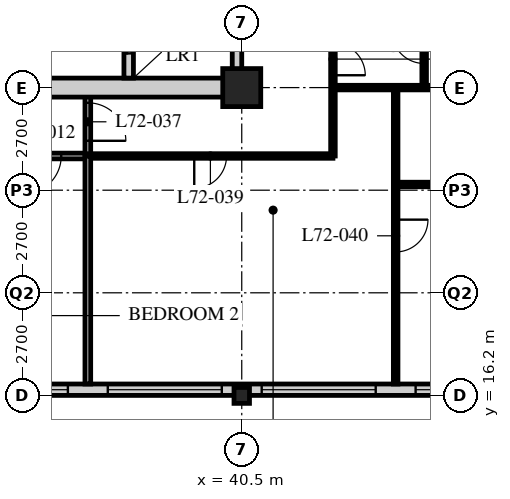
"""IFC4 building model, lengths in metres.
Left out: names, types, materials, properties, quantities, classifications, styles, units other than length and angle.
Written with IfcOpenShell. Run it as: python <this file> out.ifc"""

import sys

from ifc_helpers import new_model, si_unit, direction, frame, frame_2d, origin, origin_2d, place, context, subcontext, project, spatial, rectangle, hollow_rectangle, i_section, extrude, element, fill, save


model = new_model("IFC4")
c1 = context("Model", 3, precision=1e-05, world=origin(), true_north=direction((0.0, 1.0)))
c2 = subcontext(c1, "Body", "Model", "MODEL_VIEW")
j1 = project(units=[si_unit("LENGTHUNIT", "METRE"), si_unit("PLANEANGLEUNIT", "RADIAN")], contexts=[c1])
p1 = place(None, origin())
s1 = spatial("IfcSite", under=j1, at=p1, CompositionType="ELEMENT")
p2 = place(p1, origin())
s2 = spatial("IfcBuilding", under=s1, at=p2, CompositionType="ELEMENT")
p3 = place(p2, frame((0.0, 0.0, 281.4)))
s3 = spatial("IfcBuildingStorey", under=s2, at=p3, CompositionType="ELEMENT", Elevation=281.4)
p4 = place(p3, frame((40.5, 16.2, 0.0), z_axis=(0.0, 0.0, 1.0), x_axis=(1.0, 0.0, 0.0)))
e1 = element("IfcColumn", 1, at=p4, inside=s3, PredefinedType="COLUMN", context=c2, shape_type="SweptSolid", body=[
    extrude(i_section(OverallWidth=0.407, OverallDepth=0.419, WebThickness=0.031, FlangeThickness=0.049, FilletRadius=0.015, at=origin_2d()), origin(), (0.0, 0.0, 1.0), 3.9),
])
p5 = place(p3, frame((40.5, 24.3, 0.0), z_axis=(0.0, 0.0, 1.0), x_axis=(1.0, 0.0, 0.0)))
e2 = element("IfcColumn", 2, at=p5, inside=s3, PredefinedType="COLUMN", context=c2, shape_type="SweptSolid", body=[
    extrude(hollow_rectangle(XDim=1.0, YDim=1.0, WallThickness=0.1, at=origin_2d()), origin(), (0.0, 0.0, 1.0), 3.9),
])
p6 = place(p3, frame((8.4, 16.35, 0.0), z_axis=(0.0, 0.0, 1.0), x_axis=(1.0, 0.0, 0.0)))
e3 = element("IfcWall", 3, at=p6, inside=s3, PredefinedType="SOLIDWALL", context=c2, shape_type="SweptSolid", body=[
    extrude(rectangle(XDim=40.2, YDim=0.3, at=frame_2d((20.1, 0.0))), origin(), (0.0, 0.0, 1.0), 3.69),
])
p7 = place(p6, frame((0.225, 0.0, 0.6)))
e4 = element("IfcOpeningElement", 4, at=p7, cuts=e3, PredefinedType="OPENING", context=c2, shape_type="SweptSolid", body=[
    extrude(rectangle(XDim=3.0, YDim=2.4, at=frame_2d((1.5, 1.2))), frame((0.0, 0.16, 0.0), z_axis=(0.0, -1.0, 0.0), x_axis=(1.0, 0.0, 0.0)), (0.0, 0.0, 1.0), 0.32),
])
p8 = place(p6, frame((4.275, 0.0, 0.6)))
e5 = element("IfcOpeningElement", 5, at=p8, cuts=e3, PredefinedType="OPENING", context=c2, shape_type="SweptSolid", body=[
    extrude(rectangle(XDim=3.0, YDim=2.4, at=frame_2d((1.5, 1.2))), frame((0.0, 0.16, 0.0), z_axis=(0.0, -1.0, 0.0), x_axis=(1.0, 0.0, 0.0)), (0.0, 0.0, 1.0), 0.32),
])
p9 = place(p6, frame((8.325, 0.0, 0.6)))
e6 = element("IfcOpeningElement", 6, at=p9, cuts=e3, PredefinedType="OPENING", context=c2, shape_type="SweptSolid", body=[
    extrude(rectangle(XDim=3.0, YDim=2.4, at=frame_2d((1.5, 1.2))), frame((0.0, 0.16, 0.0), z_axis=(0.0, -1.0, 0.0), x_axis=(1.0, 0.0, 0.0)), (0.0, 0.0, 1.0), 0.32),
])
p10 = place(p6, frame((12.375, 0.0, 0.6)))
e7 = element("IfcOpeningElement", 7, at=p10, cuts=e3, PredefinedType="OPENING", context=c2, shape_type="SweptSolid", body=[
    extrude(rectangle(XDim=3.0, YDim=2.4, at=frame_2d((1.5, 1.2))), frame((0.0, 0.16, 0.0), z_axis=(0.0, -1.0, 0.0), x_axis=(1.0, 0.0, 0.0)), (0.0, 0.0, 1.0), 0.32),
])
p11 = place(p6, frame((16.425, 0.0, 0.6)))
e8 = element("IfcOpeningElement", 8, at=p11, cuts=e3, PredefinedType="OPENING", context=c2, shape_type="SweptSolid", body=[
    extrude(rectangle(XDim=3.0, YDim=2.4, at=frame_2d((1.5, 1.2))), frame((0.0, 0.16, 0.0), z_axis=(0.0, -1.0, 0.0), x_axis=(1.0, 0.0, 0.0)), (0.0, 0.0, 1.0), 0.32),
])
p12 = place(p6, frame((20.475, 0.0, 0.6)))
e9 = element("IfcOpeningElement", 9, at=p12, cuts=e3, PredefinedType="OPENING", context=c2, shape_type="SweptSolid", body=[
    extrude(rectangle(XDim=3.0, YDim=2.4, at=frame_2d((1.5, 1.2))), frame((0.0, 0.16, 0.0), z_axis=(0.0, -1.0, 0.0), x_axis=(1.0, 0.0, 0.0)), (0.0, 0.0, 1.0), 0.32),
])
p13 = place(p6, frame((24.525, 0.0, 0.6)))
e10 = element("IfcOpeningElement", 10, at=p13, cuts=e3, PredefinedType="OPENING", context=c2, shape_type="SweptSolid", body=[
    extrude(rectangle(XDim=3.0, YDim=2.4, at=frame_2d((1.5, 1.2))), frame((0.0, 0.16, 0.0), z_axis=(0.0, -1.0, 0.0), x_axis=(1.0, 0.0, 0.0)), (0.0, 0.0, 1.0), 0.32),
])
p14 = place(p6, frame((28.575, 0.0, 0.6)))
e11 = element("IfcOpeningElement", 11, at=p14, cuts=e3, PredefinedType="OPENING", context=c2, shape_type="SweptSolid", body=[
    extrude(rectangle(XDim=3.0, YDim=2.4, at=frame_2d((1.5, 1.2))), frame((0.0, 0.16, 0.0), z_axis=(0.0, -1.0, 0.0), x_axis=(1.0, 0.0, 0.0)), (0.0, 0.0, 1.0), 0.32),
])
p15 = place(p6, frame((32.625, 0.0, 0.6)))
e12 = element("IfcOpeningElement", 12, at=p15, cuts=e3, PredefinedType="OPENING", context=c2, shape_type="SweptSolid", body=[
    extrude(rectangle(XDim=3.0, YDim=2.4, at=frame_2d((1.5, 1.2))), frame((0.0, 0.16, 0.0), z_axis=(0.0, -1.0, 0.0), x_axis=(1.0, 0.0, 0.0)), (0.0, 0.0, 1.0), 0.32),
])
p16 = place(p6, frame((36.675, 0.0, 0.6)))
e13 = element("IfcOpeningElement", 13, at=p16, cuts=e3, PredefinedType="OPENING", context=c2, shape_type="SweptSolid", body=[
    extrude(rectangle(XDim=3.0, YDim=2.4, at=frame_2d((1.5, 1.2))), frame((0.0, 0.16, 0.0), z_axis=(0.0, -1.0, 0.0), x_axis=(1.0, 0.0, 0.0)), (0.0, 0.0, 1.0), 0.32),
])
p17 = place(p3, frame((12.15, 22.5, 0.0), z_axis=(0.0, 0.0, 1.0), x_axis=(1.0, 0.0, 0.0)))
e14 = element("IfcWall", 14, at=p17, inside=s3, PredefinedType="PARTITIONING", context=c2, shape_type="SweptSolid", body=[
    extrude(rectangle(XDim=24.3, YDim=0.15, at=frame_2d((12.15, 0.0))), origin(), (0.0, 0.0, 1.0), 3.69),
])
p18 = place(p17, frame((4.45, 0.0, 0.0)))
e15 = element("IfcOpeningElement", 15, at=p18, cuts=e14, PredefinedType="OPENING", context=c2, shape_type="SweptSolid", body=[
    extrude(rectangle(XDim=1.0, YDim=2.1, at=frame_2d((0.5, 1.05))), frame((0.0, 0.085, 0.0), z_axis=(0.0, -1.0, 0.0), x_axis=(1.0, 0.0, 0.0)), (0.0, 0.0, 1.0), 0.17),
])
p19 = place(p17, frame((22.6, 0.0, 0.0)))
e16 = element("IfcOpeningElement", 16, at=p19, cuts=e14, PredefinedType="OPENING", context=c2, shape_type="SweptSolid", body=[
    extrude(rectangle(XDim=1.0, YDim=2.1, at=frame_2d((0.5, 1.05))), frame((0.0, 0.085, 0.0), z_axis=(0.0, -1.0, 0.0), x_axis=(1.0, 0.0, 0.0)), (0.0, 0.0, 1.0), 0.17),
])
p20 = place(p17, frame((2.625, 0.0, 0.0)))
e17 = element("IfcOpeningElement", 17, at=p20, cuts=e14, PredefinedType="OPENING", context=c2, shape_type="SweptSolid", body=[
    extrude(rectangle(XDim=1.0, YDim=2.1, at=frame_2d((0.5, 1.05))), frame((0.0, 0.085, 0.0), z_axis=(0.0, -1.0, 0.0), x_axis=(1.0, 0.0, 0.0)), (0.0, 0.0, 1.0), 0.17),
])
p21 = place(p3, frame((36.45, 22.5, 0.0), z_axis=(0.0, 0.0, 1.0), x_axis=(0.0, 1.0, 0.0)))
e18 = element("IfcWall", 18, at=p21, inside=s3, PredefinedType="PARTITIONING", context=c2, shape_type="SweptSolid", body=[
    extrude(rectangle(XDim=1.8, YDim=0.15, at=frame_2d((0.9, 0.0))), origin(), (0.0, 0.0, 1.0), 3.69),
])
p22 = place(p21, frame((0.4, 0.0, 0.0)))
e19 = element("IfcOpeningElement", 19, at=p22, cuts=e18, PredefinedType="OPENING", context=c2, shape_type="SweptSolid", body=[
    extrude(rectangle(XDim=1.0, YDim=2.1, at=frame_2d((0.5, 1.05))), frame((0.0, 0.085, 0.0), z_axis=(0.0, -1.0, 0.0), x_axis=(1.0, 0.0, 0.0)), (0.0, 0.0, 1.0), 0.17),
])
p23 = place(p3, frame((42.9, 22.5, 0.0), z_axis=(0.0, 0.0, 1.0), x_axis=(0.0, 1.0, 0.0)))
e20 = element("IfcWall", 20, at=p23, inside=s3, PredefinedType="PARTITIONING", context=c2, shape_type="SweptSolid", body=[
    extrude(rectangle(XDim=13.95, YDim=0.12, at=frame_2d((6.975, 0.0))), origin(), (0.0, 0.0, 1.0), 3.69),
])
p24 = place(p23, frame((2.125, 0.0, 0.0)))
e21 = element("IfcOpeningElement", 21, at=p24, cuts=e20, PredefinedType="OPENING", context=c2, shape_type="SweptSolid", body=[
    extrude(rectangle(XDim=0.85, YDim=2.1, at=frame_2d((0.425, 1.05))), frame((0.0, 0.07, 0.0), z_axis=(0.0, -1.0, 0.0), x_axis=(1.0, 0.0, 0.0)), (0.0, 0.0, 1.0), 0.14),
])
p25 = place(p23, frame((6.175, 0.0, 0.0)))
e22 = element("IfcOpeningElement", 22, at=p25, cuts=e20, PredefinedType="OPENING", context=c2, shape_type="SweptSolid", body=[
    extrude(rectangle(XDim=0.85, YDim=2.1, at=frame_2d((0.425, 1.05))), frame((0.0, 0.07, 0.0), z_axis=(0.0, -1.0, 0.0), x_axis=(1.0, 0.0, 0.0)), (0.0, 0.0, 1.0), 0.14),
])
p26 = place(p23, frame((10.225, 0.0, 0.0)))
e23 = element("IfcOpeningElement", 23, at=p26, cuts=e20, PredefinedType="OPENING", context=c2, shape_type="SweptSolid", body=[
    extrude(rectangle(XDim=0.85, YDim=2.1, at=frame_2d((0.425, 1.05))), frame((0.0, 0.07, 0.0), z_axis=(0.0, -1.0, 0.0), x_axis=(1.0, 0.0, 0.0)), (0.0, 0.0, 1.0), 0.14),
])
p27 = place(p3, frame((36.45, 22.5, 0.0), z_axis=(0.0, 0.0, 1.0), x_axis=(1.0, 0.0, 0.0)))
e24 = element("IfcWall", 24, at=p27, inside=s3, PredefinedType="PARTITIONING", context=c2, shape_type="SweptSolid", body=[
    extrude(rectangle(XDim=6.45, YDim=0.12, at=frame_2d((3.225, 0.0))), origin(), (0.0, 0.0, 1.0), 3.69),
])
p28 = place(p27, frame((2.8, 0.0, 0.0)))
e25 = element("IfcOpeningElement", 25, at=p28, cuts=e24, PredefinedType="OPENING", context=c2, shape_type="SweptSolid", body=[
    extrude(rectangle(XDim=0.85, YDim=2.1, at=frame_2d((0.425, 1.05))), frame((0.0, 0.07, 0.0), z_axis=(0.0, -1.0, 0.0), x_axis=(1.0, 0.0, 0.0)), (0.0, 0.0, 1.0), 0.14),
])
p29 = place(p3, frame((42.9, 24.3, 0.0), z_axis=(0.0, 0.0, 1.0), x_axis=(1.0, 0.0, 0.0)))
e26 = element("IfcWall", 26, at=p29, inside=s3, PredefinedType="PARTITIONING", context=c2, shape_type="SweptSolid", body=[
    extrude(rectangle(XDim=9.45, YDim=0.12, at=frame_2d((4.725, 0.0))), origin(), (0.0, 0.0, 1.0), 3.078),
])
p30 = place(p3, frame((36.45, 16.5, 0.0), z_axis=(0.0, 0.0, 1.0), x_axis=(0.0, 1.0, 0.0)))
e27 = element("IfcWall", 27, at=p30, inside=s3, PredefinedType="PARTITIONING", context=c2, shape_type="SweptSolid", body=[
    extrude(rectangle(XDim=6.0, YDim=0.15, at=frame_2d((3.0, 0.0))), origin(), (0.0, 0.0, 1.0), 3.69),
])
p31 = place(p3, frame((44.55, 16.5, 0.0), z_axis=(0.0, 0.0, 1.0), x_axis=(0.0, 1.0, 0.0)))
e28 = element("IfcWall", 28, at=p31, inside=s3, PredefinedType="PARTITIONING", context=c2, shape_type="SweptSolid", body=[
    extrude(rectangle(XDim=7.8, YDim=0.12, at=frame_2d((3.9, 0.0))), origin(), (0.0, 0.0, 1.0), 3.69),
])
p32 = place(p31, frame((3.475, 0.0, 0.0)))
e29 = element("IfcOpeningElement", 29, at=p32, cuts=e28, PredefinedType="OPENING", context=c2, shape_type="SweptSolid", body=[
    extrude(rectangle(XDim=0.85, YDim=2.1, at=frame_2d((0.425, 1.05))), frame((0.0, 0.07, 0.0), z_axis=(0.0, -1.0, 0.0), x_axis=(1.0, 0.0, 0.0)), (0.0, 0.0, 1.0), 0.14),
])
p33 = place(p3, frame((45.3, 24.3, 0.0), z_axis=(0.0, 0.0, 1.0), x_axis=(0.0, 1.0, 0.0)))
e30 = element("IfcWall", 30, at=p33, inside=s3, PredefinedType="PARTITIONING", context=c2, shape_type="SweptSolid", body=[
    extrude(rectangle(XDim=1.76, YDim=0.12, at=frame_2d((0.88, 0.0))), origin(), (0.0, 0.0, 1.0), 3.69),
])
p34 = place(p33, frame((0.635, 0.0, 0.0)))
e31 = element("IfcOpeningElement", 31, at=p34, cuts=e30, PredefinedType="OPENING", context=c2, shape_type="SweptSolid", body=[
    extrude(rectangle(XDim=0.85, YDim=2.1, at=frame_2d((0.425, 1.05))), frame((0.0, 0.07, 0.0), z_axis=(0.0, -1.0, 0.0), x_axis=(1.0, 0.0, 0.0)), (0.0, 0.0, 1.0), 0.14),
])
p35 = place(p3, frame((44.55, 21.75, 0.0), z_axis=(0.0, 0.0, 1.0), x_axis=(1.0, 0.0, 0.0)))
e32 = element("IfcWall", 32, at=p35, inside=s3, PredefinedType="PARTITIONING", context=c2, shape_type="SweptSolid", body=[
    extrude(rectangle(XDim=7.8, YDim=0.12, at=frame_2d((3.9, 0.0))), origin(), (0.0, 0.0, 1.0), 3.69),
])
p36 = place(p35, frame((3.475, 0.0, 0.0)))
e33 = element("IfcOpeningElement", 33, at=p36, cuts=e32, PredefinedType="OPENING", context=c2, shape_type="SweptSolid", body=[
    extrude(rectangle(XDim=0.85, YDim=2.1, at=frame_2d((0.425, 1.05))), frame((0.0, 0.07, 0.0), z_axis=(0.0, -1.0, 0.0), x_axis=(1.0, 0.0, 0.0)), (0.0, 0.0, 1.0), 0.14),
])
p37 = place(p3, frame((15.95, 24.3, 0.0), z_axis=(0.0, 0.0, 1.0), x_axis=(1.0, 0.0, 0.0)))
e34 = element("IfcWall", 34, at=p37, inside=s3, PredefinedType="SOLIDWALL", context=c2, shape_type="SweptSolid", body=[
    extrude(rectangle(XDim=24.55, YDim=0.5, at=frame_2d((12.275, 0.0))), origin(), (0.0, 0.0, 1.0), 3.04),
])
p38 = place(p37, frame((11.5, 0.0, 0.0)))
e35 = element("IfcOpeningElement", 35, at=p38, cuts=e34, PredefinedType="OPENING", context=c2, shape_type="SweptSolid", body=[
    extrude(rectangle(XDim=1.8, YDim=2.4, at=frame_2d((0.9, 1.2))), frame((0.0, 0.26, 0.0), z_axis=(0.0, -1.0, 0.0), x_axis=(1.0, 0.0, 0.0)), (0.0, 0.0, 1.0), 0.52),
])
p39 = place(p3, frame((40.375, 24.55, 0.0), z_axis=(0.0, 0.0, 1.0), x_axis=(0.0, 1.0, 0.0)))
e36 = element("IfcWall", 36, at=p39, inside=s3, PredefinedType="SOLIDWALL", context=c2, shape_type="SweptSolid", body=[
    extrude(rectangle(XDim=15.7, YDim=0.25, at=frame_2d((7.85, 0.0))), origin(), (0.0, 0.0, 1.0), 3.078),
])
p40 = place(p3, frame((37.525, 24.55, 0.0), z_axis=(0.0, 0.0, 1.0), x_axis=(0.0, 1.0, 0.0)))
e37 = element("IfcWall", 37, at=p40, inside=s3, PredefinedType="SOLIDWALL", context=c2, shape_type="SweptSolid", body=[
    extrude(rectangle(XDim=7.75, YDim=0.25, at=frame_2d((3.875, 0.0))), origin(), (0.0, 0.0, 1.0), 3.69),
])
p41 = place(p40, frame((0.65, 0.0, 0.0)))
e38 = element("IfcOpeningElement", 38, at=p41, cuts=e37, PredefinedType="OPENING", context=c2, shape_type="SweptSolid", body=[
    extrude(rectangle(XDim=1.1, YDim=2.4, at=frame_2d((0.55, 1.2))), frame((0.0, 0.135, 0.0), z_axis=(0.0, -1.0, 0.0), x_axis=(1.0, 0.0, 0.0)), (0.0, 0.0, 1.0), 0.27),
])
p42 = place(p40, frame((3.25, 0.0, 0.0)))
e39 = element("IfcOpeningElement", 39, at=p42, cuts=e37, PredefinedType="OPENING", context=c2, shape_type="SweptSolid", body=[
    extrude(rectangle(XDim=1.1, YDim=2.4, at=frame_2d((0.55, 1.2))), frame((0.0, 0.135, 0.0), z_axis=(0.0, -1.0, 0.0), x_axis=(1.0, 0.0, 0.0)), (0.0, 0.0, 1.0), 0.27),
])
p43 = place(p40, frame((5.85, 0.0, 0.0)))
e40 = element("IfcOpeningElement", 40, at=p43, cuts=e37, PredefinedType="OPENING", context=c2, shape_type="SweptSolid", body=[
    extrude(rectangle(XDim=1.1, YDim=2.4, at=frame_2d((0.55, 1.2))), frame((0.0, 0.135, 0.0), z_axis=(0.0, -1.0, 0.0), x_axis=(1.0, 0.0, 0.0)), (0.0, 0.0, 1.0), 0.27),
])
p44 = place(p13, origin())
e41 = element("IfcWindow", 41, at=p44, inside=s3, PartitioningType="SINGLE_PANEL", PredefinedType="WINDOW", context=c2, shape_type="SweptSolid", body=[
    extrude(rectangle(XDim=3.0, YDim=2.4, at=frame_2d((1.5, 1.2))), frame((0.0, 0.03, 0.0), z_axis=(0.0, -1.0, 0.0), x_axis=(1.0, 0.0, 0.0)), (0.0, 0.0, 1.0), 0.06),
])
fill(e10, e41)
p45 = place(p14, origin())
e42 = element("IfcWindow", 42, at=p45, inside=s3, PartitioningType="SINGLE_PANEL", PredefinedType="WINDOW", context=c2, shape_type="SweptSolid", body=[
    extrude(rectangle(XDim=3.0, YDim=2.4, at=frame_2d((1.5, 1.2))), frame((0.0, 0.03, 0.0), z_axis=(0.0, -1.0, 0.0), x_axis=(1.0, 0.0, 0.0)), (0.0, 0.0, 1.0), 0.06),
])
fill(e11, e42)
p46 = place(p15, origin())
e43 = element("IfcWindow", 43, at=p46, inside=s3, PartitioningType="SINGLE_PANEL", PredefinedType="WINDOW", context=c2, shape_type="SweptSolid", body=[
    extrude(rectangle(XDim=3.0, YDim=2.4, at=frame_2d((1.5, 1.2))), frame((0.0, 0.03, 0.0), z_axis=(0.0, -1.0, 0.0), x_axis=(1.0, 0.0, 0.0)), (0.0, 0.0, 1.0), 0.06),
])
fill(e12, e43)
p47 = place(p16, origin())
e44 = element("IfcWindow", 44, at=p47, inside=s3, PartitioningType="SINGLE_PANEL", PredefinedType="WINDOW", context=c2, shape_type="SweptSolid", body=[
    extrude(rectangle(XDim=3.0, YDim=2.4, at=frame_2d((1.5, 1.2))), frame((0.0, 0.03, 0.0), z_axis=(0.0, -1.0, 0.0), x_axis=(1.0, 0.0, 0.0)), (0.0, 0.0, 1.0), 0.06),
])
fill(e13, e44)
p48 = place(p19, origin())
e45 = element("IfcDoor", 45, at=p48, inside=s3, OperationType="SINGLE_SWING_RIGHT", PredefinedType="DOOR", context=c2, shape_type="SweptSolid", body=[
    extrude(rectangle(XDim=1.0, YDim=2.1, at=frame_2d((0.5, 1.05))), frame((0.0, 0.025, 0.0), z_axis=(0.0, -1.0, 0.0), x_axis=(1.0, 0.0, 0.0)), (0.0, 0.0, 1.0), 0.05),
])
fill(e16, e45)
p49 = place(p22, origin())
e46 = element("IfcDoor", 46, at=p49, inside=s3, OperationType="SINGLE_SWING_RIGHT", PredefinedType="DOOR", context=c2, shape_type="SweptSolid", body=[
    extrude(rectangle(XDim=1.0, YDim=2.1, at=frame_2d((0.5, 1.05))), frame((0.0, 0.025, 0.0), z_axis=(0.0, -1.0, 0.0), x_axis=(1.0, 0.0, 0.0)), (0.0, 0.0, 1.0), 0.05),
])
fill(e19, e46)
p50 = place(p28, origin())
e47 = element("IfcDoor", 47, at=p50, inside=s3, OperationType="SINGLE_SWING_RIGHT", PredefinedType="DOOR", context=c2, shape_type="SweptSolid", body=[
    extrude(rectangle(XDim=0.85, YDim=2.1, at=frame_2d((0.425, 1.05))), frame((0.0, 0.025, 0.0), z_axis=(0.0, -1.0, 0.0), x_axis=(1.0, 0.0, 0.0)), (0.0, 0.0, 1.0), 0.05),
])
fill(e25, e47)
p51 = place(p32, origin())
e48 = element("IfcDoor", 48, at=p51, inside=s3, OperationType="SINGLE_SWING_LEFT", PredefinedType="DOOR", context=c2, shape_type="SweptSolid", body=[
    extrude(rectangle(XDim=0.85, YDim=2.1, at=frame_2d((0.425, 1.05))), frame((0.0, 0.025, 0.0), z_axis=(0.0, -1.0, 0.0), x_axis=(1.0, 0.0, 0.0)), (0.0, 0.0, 1.0), 0.05),
])
fill(e29, e48)
p52 = place(p24, origin())
e49 = element("IfcDoor", 49, at=p52, inside=s3, OperationType="SINGLE_SWING_RIGHT", PredefinedType="DOOR", context=c2, shape_type="SweptSolid", body=[
    extrude(rectangle(XDim=0.85, YDim=2.1, at=frame_2d((0.425, 1.05))), frame((0.0, 0.025, 0.0), z_axis=(0.0, -1.0, 0.0), x_axis=(1.0, 0.0, 0.0)), (0.0, 0.0, 1.0), 0.05),
])
fill(e21, e49)
p53 = place(p34, origin())
e50 = element("IfcDoor", 50, at=p53, inside=s3, OperationType="SINGLE_SWING_RIGHT", PredefinedType="DOOR", context=c2, shape_type="SweptSolid", body=[
    extrude(rectangle(XDim=0.85, YDim=2.1, at=frame_2d((0.425, 1.05))), frame((0.0, 0.025, 0.0), z_axis=(0.0, -1.0, 0.0), x_axis=(1.0, 0.0, 0.0)), (0.0, 0.0, 1.0), 0.05),
])
fill(e31, e50)
p54 = place(p41, origin())
e51 = element("IfcDoor", 51, at=p54, inside=s3, OperationType="DOUBLE_DOOR_SLIDING", PredefinedType="DOOR", context=c2, shape_type="SweptSolid", body=[
    extrude(rectangle(XDim=1.1, YDim=2.4, at=frame_2d((0.55, 1.2))), frame((0.0, 0.025, 0.0), z_axis=(0.0, -1.0, 0.0), x_axis=(1.0, 0.0, 0.0)), (0.0, 0.0, 1.0), 0.05),
])
fill(e38, e51)
save(model, sys.argv[1])
